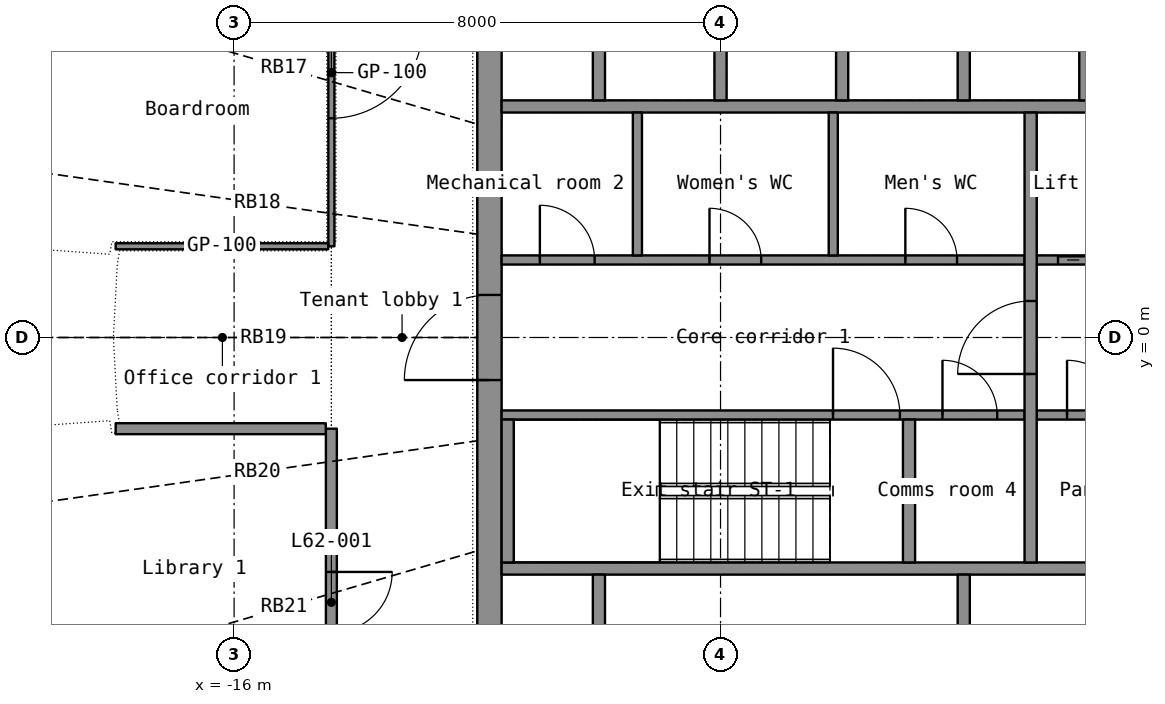
"""IFC4 building model, lengths in metres.
Left out: names, types, materials, properties, quantities, classifications, styles, units other than length and angle.
Written with IfcOpenShell. Run it as: python <this file> out.ifc"""

import sys

from ifc_helpers import new_model, si_unit, direction, frame, frame_2d, origin, place, context, subcontext, project, spatial, rectangle, extrude, element, fill, save


model = new_model("IFC4")
c1 = context("Model", 3, precision=1e-05, world=origin(), true_north=direction((0.0, 1.0)))
c2 = subcontext(c1, "Body", "Model", "MODEL_VIEW")
j1 = project(units=[si_unit("LENGTHUNIT", "METRE"), si_unit("PLANEANGLEUNIT", "RADIAN")], contexts=[c1])
p1 = place(None, origin())
s1 = spatial("IfcSite", under=j1, at=p1, CompositionType="ELEMENT")
p2 = place(p1, origin())
s2 = spatial("IfcBuilding", under=s1, at=p2, CompositionType="ELEMENT")
p3 = place(p2, frame((0.0, 0.0, 254.1)))
s3 = spatial("IfcBuildingStorey", under=s2, at=p3, CompositionType="ELEMENT", Elevation=254.1)
p4 = place(p3, frame((-11.8, -7.2, 0.0), z_axis=(0.0, 0.0, 1.0), x_axis=(0.0, 1.0, 0.0)))
e1 = element("IfcWall", 1, at=p4, inside=s3, PredefinedType="SHEAR", context=c2, shape_type="SweptSolid", body=[
    extrude(rectangle(XDim=14.4, YDim=0.4, at=frame_2d((7.2, 0.0))), origin(), (0.0, 0.0, 1.0), 3.3),
])
p5 = place(p4, frame((6.5, 0.0, 0.0)))
e2 = element("IfcOpeningElement", 2, at=p5, cuts=e1, PredefinedType="OPENING", context=c2, shape_type="SweptSolid", body=[
    extrude(rectangle(XDim=1.4, YDim=2.2, at=frame_2d((0.7, 1.1))), frame((0.0, 0.21, 0.0), z_axis=(0.0, -1.0, 0.0), x_axis=(1.0, 0.0, 0.0)), (0.0, 0.0, 1.0), 0.42),
])
for number, where, z_axis, x_axis in (
    (3, (-11.6, -3.8, 0.0), (0.0, 0.0, 1.0), (1.0, 0.0, 0.0)),
    (4, (-11.6, 3.8, 0.0), (0.0, 0.0, 1.0), (1.0, 0.0, 0.0)),
):
    element("IfcWall", number, at=place(p3, frame(where, z_axis=z_axis, x_axis=x_axis)), inside=s3, PredefinedType="SHEAR", context=c2, shape_type="SweptSolid", body=[
        extrude(rectangle(XDim=23.2, YDim=0.2, at=frame_2d((11.6, 0.0))), origin(), (0.0, 0.0, 1.0), 3.3),
    ])
p6 = place(p3, frame((-10.0, -6.8, 0.0), z_axis=(0.0, 0.0, 1.0), x_axis=(0.0, 1.0, 0.0)))
e5 = element("IfcWall", 5, at=p6, inside=s3, PredefinedType="SHEAR", context=c2, shape_type="SweptSolid", body=[
    extrude(rectangle(XDim=2.9, YDim=0.2, at=frame_2d((1.45, 0.0))), origin(), (0.0, 0.0, 1.0), 3.3),
])
p7 = place(p3, frame((-4.0, -6.8, 0.0), z_axis=(0.0, 0.0, 1.0), x_axis=(0.0, 1.0, 0.0)))
e6 = element("IfcWall", 6, at=p7, inside=s3, PredefinedType="PARTITIONING", context=c2, shape_type="SweptSolid", body=[
    extrude(rectangle(XDim=2.9, YDim=0.2, at=frame_2d((1.45, 0.0))), origin(), (0.0, 0.0, 1.0), 3.3),
])
for number, where, z_axis, x_axis in (
    (7, (-10.0, 3.9, 0.0), (0.0, 0.0, 1.0), (0.0, 1.0, 0.0)),
    (8, (-8.0, 3.9, 0.0), (0.0, 0.0, 1.0), (0.0, 1.0, 0.0)),
    (9, (-6.0, 3.9, 0.0), (0.0, 0.0, 1.0), (0.0, 1.0, 0.0)),
    (10, (-4.0, 3.9, 0.0), (0.0, 0.0, 1.0), (0.0, 1.0, 0.0)),
    (11, (-2.0, 3.9, 0.0), (0.0, 0.0, 1.0), (0.0, 1.0, 0.0)),
):
    element("IfcWall", number, at=place(p3, frame(where, z_axis=z_axis, x_axis=x_axis)), inside=s3, PredefinedType="SHEAR", context=c2, shape_type="SweptSolid", body=[
        extrude(rectangle(XDim=2.9, YDim=0.2, at=frame_2d((1.45, 0.0))), origin(), (0.0, 0.0, 1.0), 3.3),
    ])
p8 = place(p3, frame((-11.6, -1.275, 0.0), z_axis=(0.0, 0.0, 1.0), x_axis=(1.0, 0.0, 0.0)))
e12 = element("IfcWall", 12, at=p8, inside=s3, PredefinedType="SHEAR", context=c2, shape_type="SweptSolid", body=[
    extrude(rectangle(XDim=8.6, YDim=0.15, at=frame_2d((4.3, 0.0))), origin(), (0.0, 0.0, 1.0), 3.3),
])
p9 = place(p8, frame((5.45, 0.0, 0.0)))
e13 = element("IfcOpeningElement", 13, at=p9, cuts=e12, PredefinedType="OPENING", context=c2, shape_type="SweptSolid", body=[
    extrude(rectangle(XDim=1.1, YDim=2.15, at=frame_2d((0.55, 1.075))), frame((0.0, 0.085, 0.0), z_axis=(0.0, -1.0, 0.0), x_axis=(1.0, 0.0, 0.0)), (0.0, 0.0, 1.0), 0.17),
])
p10 = place(p8, frame((7.25, 0.0, 0.0)))
e14 = element("IfcOpeningElement", 14, at=p10, cuts=e12, PredefinedType="OPENING", context=c2, shape_type="SweptSolid", body=[
    extrude(rectangle(XDim=0.9, YDim=2.1, at=frame_2d((0.45, 1.05))), frame((0.0, 0.085, 0.0), z_axis=(0.0, -1.0, 0.0), x_axis=(1.0, 0.0, 0.0)), (0.0, 0.0, 1.0), 0.17),
])
p11 = place(p3, frame((-2.8, -1.275, 0.0), z_axis=(0.0, 0.0, 1.0), x_axis=(1.0, 0.0, 0.0)))
e15 = element("IfcWall", 15, at=p11, inside=s3, PredefinedType="SHEAR", context=c2, shape_type="SweptSolid", body=[
    extrude(rectangle(XDim=5.6, YDim=0.15, at=frame_2d((2.8, 0.0))), origin(), (0.0, 0.0, 1.0), 3.3),
])
p12 = place(p11, frame((4.15, 0.0, 0.0)))
e16 = element("IfcOpeningElement", 16, at=p12, cuts=e15, PredefinedType="OPENING", context=c2, shape_type="SweptSolid", body=[
    extrude(rectangle(XDim=1.1, YDim=2.2, at=frame_2d((0.55, 1.1))), frame((0.0, 0.085, 0.0), z_axis=(0.0, -1.0, 0.0), x_axis=(1.0, 0.0, 0.0)), (0.0, 0.0, 1.0), 0.17),
])
p13 = place(p11, frame((0.499, 0.0, 0.0)))
e17 = element("IfcOpeningElement", 17, at=p13, cuts=e15, PredefinedType="OPENING", context=c2, shape_type="SweptSolid", body=[
    extrude(rectangle(XDim=0.9, YDim=2.1, at=frame_2d((0.45, 1.05))), frame((0.0, 0.085, 0.0), z_axis=(0.0, -1.0, 0.0), x_axis=(1.0, 0.0, 0.0)), (0.0, 0.0, 1.0), 0.17),
])
p14 = place(p11, frame((2.374, 0.0, 0.0)))
e18 = element("IfcOpeningElement", 18, at=p14, cuts=e15, PredefinedType="OPENING", context=c2, shape_type="SweptSolid", body=[
    extrude(rectangle(XDim=0.9, YDim=2.1, at=frame_2d((0.45, 1.05))), frame((0.0, 0.085, 0.0), z_axis=(0.0, -1.0, 0.0), x_axis=(1.0, 0.0, 0.0)), (0.0, 0.0, 1.0), 0.17),
])
p15 = place(p3, frame((-11.6, 1.275, 0.0), z_axis=(0.0, 0.0, 1.0), x_axis=(1.0, 0.0, 0.0)))
e19 = element("IfcWall", 19, at=p15, inside=s3, PredefinedType="PARTITIONING", context=c2, shape_type="SweptSolid", body=[
    extrude(rectangle(XDim=8.6, YDim=0.15, at=frame_2d((4.3, 0.0))), origin(), (0.0, 0.0, 1.0), 3.3),
])
p16 = place(p15, frame((0.629, 0.0, 0.0)))
e20 = element("IfcOpeningElement", 20, at=p16, cuts=e19, PredefinedType="OPENING", context=c2, shape_type="SweptSolid", body=[
    extrude(rectangle(XDim=0.9, YDim=2.1, at=frame_2d((0.45, 1.05))), frame((0.0, 0.085, 0.0), z_axis=(0.0, -1.0, 0.0), x_axis=(1.0, 0.0, 0.0)), (0.0, 0.0, 1.0), 0.17),
])
p17 = place(p15, frame((3.418, 0.0, 0.0)))
e21 = element("IfcOpeningElement", 21, at=p17, cuts=e19, PredefinedType="OPENING", context=c2, shape_type="SweptSolid", body=[
    extrude(rectangle(XDim=0.85, YDim=2.1, at=frame_2d((0.425, 1.05))), frame((0.0, 0.085, 0.0), z_axis=(0.0, -1.0, 0.0), x_axis=(1.0, 0.0, 0.0)), (0.0, 0.0, 1.0), 0.17),
])
p18 = place(p15, frame((6.639, 0.0, 0.0)))
e22 = element("IfcOpeningElement", 22, at=p18, cuts=e19, PredefinedType="OPENING", context=c2, shape_type="SweptSolid", body=[
    extrude(rectangle(XDim=0.85, YDim=2.1, at=frame_2d((0.425, 1.05))), frame((0.0, 0.085, 0.0), z_axis=(0.0, -1.0, 0.0), x_axis=(1.0, 0.0, 0.0)), (0.0, 0.0, 1.0), 0.17),
])
p19 = place(p3, frame((-2.8, 1.275, 0.0), z_axis=(0.0, 0.0, 1.0), x_axis=(1.0, 0.0, 0.0)))
e23 = element("IfcWall", 23, at=p19, inside=s3, PredefinedType="SHEAR", context=c2, shape_type="SweptSolid", body=[
    extrude(rectangle(XDim=5.6, YDim=0.15, at=frame_2d((2.8, 0.0))), origin(), (0.0, 0.0, 1.0), 3.3),
])
p20 = place(p19, frame((0.35, 0.0, 0.0)))
e24 = element("IfcOpeningElement", 24, at=p20, cuts=e23, PredefinedType="OPENING", context=c2, shape_type="SweptSolid", body=[
    extrude(rectangle(XDim=1.1, YDim=2.2, at=frame_2d((0.55, 1.1))), frame((0.0, 0.085, 0.0), z_axis=(0.0, -1.0, 0.0), x_axis=(1.0, 0.0, 0.0)), (0.0, 0.0, 1.0), 0.17),
])
p21 = place(p19, frame((2.413, 0.0, 0.0)))
e25 = element("IfcOpeningElement", 25, at=p21, cuts=e23, PredefinedType="OPENING", context=c2, shape_type="SweptSolid", body=[
    extrude(rectangle(XDim=0.9, YDim=2.1, at=frame_2d((0.45, 1.05))), frame((0.0, 0.085, 0.0), z_axis=(0.0, -1.0, 0.0), x_axis=(1.0, 0.0, 0.0)), (0.0, 0.0, 1.0), 0.17),
])
p22 = place(p19, frame((4.288, 0.0, 0.0)))
e26 = element("IfcOpeningElement", 26, at=p22, cuts=e23, PredefinedType="OPENING", context=c2, shape_type="SweptSolid", body=[
    extrude(rectangle(XDim=0.9, YDim=2.1, at=frame_2d((0.45, 1.05))), frame((0.0, 0.085, 0.0), z_axis=(0.0, -1.0, 0.0), x_axis=(1.0, 0.0, 0.0)), (0.0, 0.0, 1.0), 0.17),
])
p23 = place(p3, frame((-2.9, -3.7, 0.0), z_axis=(0.0, 0.0, 1.0), x_axis=(0.0, 1.0, 0.0)))
e27 = element("IfcWall", 27, at=p23, inside=s3, PredefinedType="SHEAR", context=c2, shape_type="SweptSolid", body=[
    extrude(rectangle(XDim=7.4, YDim=0.2, at=frame_2d((3.7, 0.0))), origin(), (0.0, 0.0, 1.0), 3.3),
])
p24 = place(p23, frame((3.1, 0.0, 0.0)))
e28 = element("IfcOpeningElement", 28, at=p24, cuts=e27, PredefinedType="OPENING", context=c2, shape_type="SweptSolid", body=[
    extrude(rectangle(XDim=1.2, YDim=2.2, at=frame_2d((0.6, 1.1))), frame((0.0, 0.11, 0.0), z_axis=(0.0, -1.0, 0.0), x_axis=(1.0, 0.0, 0.0)), (0.0, 0.0, 1.0), 0.22),
])
for number, where, z_axis, x_axis in (
    (29, (-11.5, -3.7, 0.0), (0.0, 0.0, 1.0), (0.0, 1.0, 0.0)),
    (30, (-4.9, -3.7, 0.0), (0.0, 0.0, 1.0), (0.0, 1.0, 0.0)),
):
    element("IfcWall", number, at=place(p3, frame(where, z_axis=z_axis, x_axis=x_axis)), inside=s3, PredefinedType="SHEAR", context=c2, shape_type="SweptSolid", body=[
        extrude(rectangle(XDim=2.35, YDim=0.2, at=frame_2d((1.175, 0.0))), origin(), (0.0, 0.0, 1.0), 3.3),
    ])
for number, where, z_axis, x_axis in (
    (31, (-9.367, 1.35, 0.0), (0.0, 0.0, 1.0), (0.0, 1.0, 0.0)),
    (32, (-6.146, 1.35, 0.0), (0.0, 0.0, 1.0), (0.0, 1.0, 0.0)),
):
    element("IfcWall", number, at=place(p3, frame(where, z_axis=z_axis, x_axis=x_axis)), inside=s3, PredefinedType="PARTITIONING", context=c2, shape_type="SweptSolid", body=[
        extrude(rectangle(XDim=2.35, YDim=0.15, at=frame_2d((1.175, 0.0))), origin(), (0.0, 0.0, 1.0), 3.3),
    ])
p25 = place(p3, frame((-14.4, -1.5, 0.0), z_axis=(0.0, 0.0, 1.0), x_axis=(0.0, -1.0, 0.0)))
e33 = element("IfcWall", 33, at=p25, inside=s3, PredefinedType="PARTITIONING", context=c2, shape_type="SweptSolid", body=[
    extrude(rectangle(XDim=5.712, YDim=0.18, at=frame_2d((2.856, 0.0))), origin(), (0.0, 0.0, 1.0), 2.4),
])
p26 = place(p25, frame((2.356, 0.0, 0.0)))
e34 = element("IfcOpeningElement", 34, at=p26, cuts=e33, PredefinedType="OPENING", context=c2, shape_type="SweptSolid", body=[
    extrude(rectangle(XDim=1.0, YDim=2.1, at=frame_2d((0.5, 1.05))), frame((0.0, 0.1, 0.0), z_axis=(0.0, -1.0, 0.0), x_axis=(1.0, 0.0, 0.0)), (0.0, 0.0, 1.0), 0.2),
])
p27 = place(p3, frame((-14.4, 7.212, 0.0), z_axis=(0.0, 0.0, 1.0), x_axis=(0.0, -1.0, 0.0)))
e35 = element("IfcWall", 35, at=p27, inside=s3, PredefinedType="PARTITIONING", context=c2, shape_type="SweptSolid", body=[
    extrude(rectangle(XDim=5.712, YDim=0.1, at=frame_2d((2.856, 0.0))), origin(), (0.0, 0.0, 1.0), 2.4),
])
p28 = place(p27, frame((2.106, 0.0, 0.0)))
e36 = element("IfcOpeningElement", 36, at=p28, cuts=e35, PredefinedType="OPENING", context=c2, shape_type="SweptSolid", body=[
    extrude(rectangle(XDim=1.5, YDim=2.4, at=frame_2d((0.75, 1.2))), frame((0.0, 0.06, 0.0), z_axis=(0.0, -1.0, 0.0), x_axis=(1.0, 0.0, 0.0)), (0.0, 0.0, 1.0), 0.12),
])
p29 = place(p3, frame((-17.948, -1.5, 0.0), z_axis=(0.0, 0.0, 1.0), x_axis=(1.0, 0.0, 0.0)))
e37 = element("IfcWall", 37, at=p29, inside=s3, PredefinedType="PARTITIONING", context=c2, shape_type="SweptSolid", body=[
    extrude(rectangle(XDim=3.456, YDim=0.18, at=frame_2d((1.728, 0.0))), origin(), (0.0, 0.0, 1.0), 2.4),
])
p30 = place(p3, frame((-14.452, 1.5, 0.0), z_axis=(0.0, 0.0, 1.0), x_axis=(-1.0, 0.0, 0.0)))
e38 = element("IfcWall", 38, at=p30, inside=s3, PredefinedType="PARTITIONING", context=c2, shape_type="SweptSolid", body=[
    extrude(rectangle(XDim=3.496, YDim=0.1, at=frame_2d((1.748, 0.0))), origin(), (0.0, 0.0, 1.0), 2.4),
])
p31 = place(p5, origin())
e39 = element("IfcDoor", 39, at=p31, inside=s3, OperationType="DOUBLE_DOOR_SINGLE_SWING", PredefinedType="DOOR", context=c2, shape_type="SweptSolid", body=[
    extrude(rectangle(XDim=1.4, YDim=2.2, at=frame_2d((0.7, 1.1))), frame((0.0, 0.025, 0.0), z_axis=(0.0, -1.0, 0.0), x_axis=(1.0, 0.0, 0.0)), (0.0, 0.0, 1.0), 0.05),
])
fill(e2, e39)
p32 = place(p24, origin())
e40 = element("IfcDoor", 40, at=p32, inside=s3, OperationType="SINGLE_SWING_LEFT", PredefinedType="DOOR", context=c2, shape_type="SweptSolid", body=[
    extrude(rectangle(XDim=1.2, YDim=2.2, at=frame_2d((0.6, 1.1))), frame((0.0, 0.025, 0.0), z_axis=(0.0, -1.0, 0.0), x_axis=(1.0, 0.0, 0.0)), (0.0, 0.0, 1.0), 0.05),
])
fill(e28, e40)
p33 = place(p20, origin())
e41 = element("IfcDoor", 41, at=p33, inside=s3, OperationType="DOUBLE_DOOR_SLIDING", PredefinedType="DOOR", context=c2, shape_type="SweptSolid", body=[
    extrude(rectangle(XDim=1.1, YDim=2.2, at=frame_2d((0.55, 1.1))), frame((0.0, 0.025, 0.0), z_axis=(0.0, -1.0, 0.0), x_axis=(1.0, 0.0, 0.0)), (0.0, 0.0, 1.0), 0.05),
])
fill(e24, e41)
p34 = place(p9, origin())
e42 = element("IfcDoor", 42, at=p34, inside=s3, OperationType="SINGLE_SWING_LEFT", PredefinedType="DOOR", context=c2, shape_type="SweptSolid", body=[
    extrude(rectangle(XDim=1.1, YDim=2.15, at=frame_2d((0.55, 1.075))), frame((0.0, 0.025, 0.0), z_axis=(0.0, -1.0, 0.0), x_axis=(1.0, 0.0, 0.0)), (0.0, 0.0, 1.0), 0.05),
])
fill(e13, e42)
p35 = place(p16, origin())
e43 = element("IfcDoor", 43, at=p35, inside=s3, OperationType="SINGLE_SWING_LEFT", PredefinedType="DOOR", context=c2, shape_type="SweptSolid", body=[
    extrude(rectangle(XDim=0.9, YDim=2.1, at=frame_2d((0.45, 1.05))), frame((0.0, 0.025, 0.0), z_axis=(0.0, -1.0, 0.0), x_axis=(1.0, 0.0, 0.0)), (0.0, 0.0, 1.0), 0.05),
])
fill(e20, e43)
p36 = place(p17, origin())
e44 = element("IfcDoor", 44, at=p36, inside=s3, OperationType="SINGLE_SWING_LEFT", PredefinedType="DOOR", context=c2, shape_type="SweptSolid", body=[
    extrude(rectangle(XDim=0.85, YDim=2.1, at=frame_2d((0.425, 1.05))), frame((0.0, 0.025, 0.0), z_axis=(0.0, -1.0, 0.0), x_axis=(1.0, 0.0, 0.0)), (0.0, 0.0, 1.0), 0.05),
])
fill(e21, e44)
p37 = place(p18, origin())
e45 = element("IfcDoor", 45, at=p37, inside=s3, OperationType="SINGLE_SWING_LEFT", PredefinedType="DOOR", context=c2, shape_type="SweptSolid", body=[
    extrude(rectangle(XDim=0.85, YDim=2.1, at=frame_2d((0.425, 1.05))), frame((0.0, 0.025, 0.0), z_axis=(0.0, -1.0, 0.0), x_axis=(1.0, 0.0, 0.0)), (0.0, 0.0, 1.0), 0.05),
])
fill(e22, e45)
p38 = place(p13, origin())
e46 = element("IfcDoor", 46, at=p38, inside=s3, OperationType="SINGLE_SWING_LEFT", PredefinedType="DOOR", context=c2, shape_type="SweptSolid", body=[
    extrude(rectangle(XDim=0.9, YDim=2.1, at=frame_2d((0.45, 1.05))), frame((0.0, 0.025, 0.0), z_axis=(0.0, -1.0, 0.0), x_axis=(1.0, 0.0, 0.0)), (0.0, 0.0, 1.0), 0.05),
])
fill(e17, e46)
p39 = place(p10, origin())
e47 = element("IfcDoor", 47, at=p39, inside=s3, OperationType="SINGLE_SWING_LEFT", PredefinedType="DOOR", context=c2, shape_type="SweptSolid", body=[
    extrude(rectangle(XDim=0.9, YDim=2.1, at=frame_2d((0.45, 1.05))), frame((0.0, 0.025, 0.0), z_axis=(0.0, -1.0, 0.0), x_axis=(1.0, 0.0, 0.0)), (0.0, 0.0, 1.0), 0.05),
])
fill(e14, e47)
p40 = place(p26, origin())
e48 = element("IfcDoor", 48, at=p40, inside=s3, OperationType="SINGLE_SWING_LEFT", PredefinedType="DOOR", context=c2, shape_type="SweptSolid", body=[
    extrude(rectangle(XDim=1.0, YDim=2.1, at=frame_2d((0.5, 1.05))), frame((0.0, 0.025, 0.0), z_axis=(0.0, -1.0, 0.0), x_axis=(1.0, 0.0, 0.0)), (0.0, 0.0, 1.0), 0.05),
])
fill(e34, e48)
p41 = place(p28, origin())
e49 = element("IfcDoor", 49, at=p41, inside=s3, OperationType="DOUBLE_DOOR_SINGLE_SWING", PredefinedType="DOOR", context=c2, shape_type="SweptSolid", body=[
    extrude(rectangle(XDim=1.5, YDim=2.4, at=frame_2d((0.75, 1.2))), frame((0.0, 0.025, 0.0), z_axis=(0.0, -1.0, 0.0), x_axis=(1.0, 0.0, 0.0)), (0.0, 0.0, 1.0), 0.05),
])
fill(e36, e49)
save(model, sys.argv[1])
